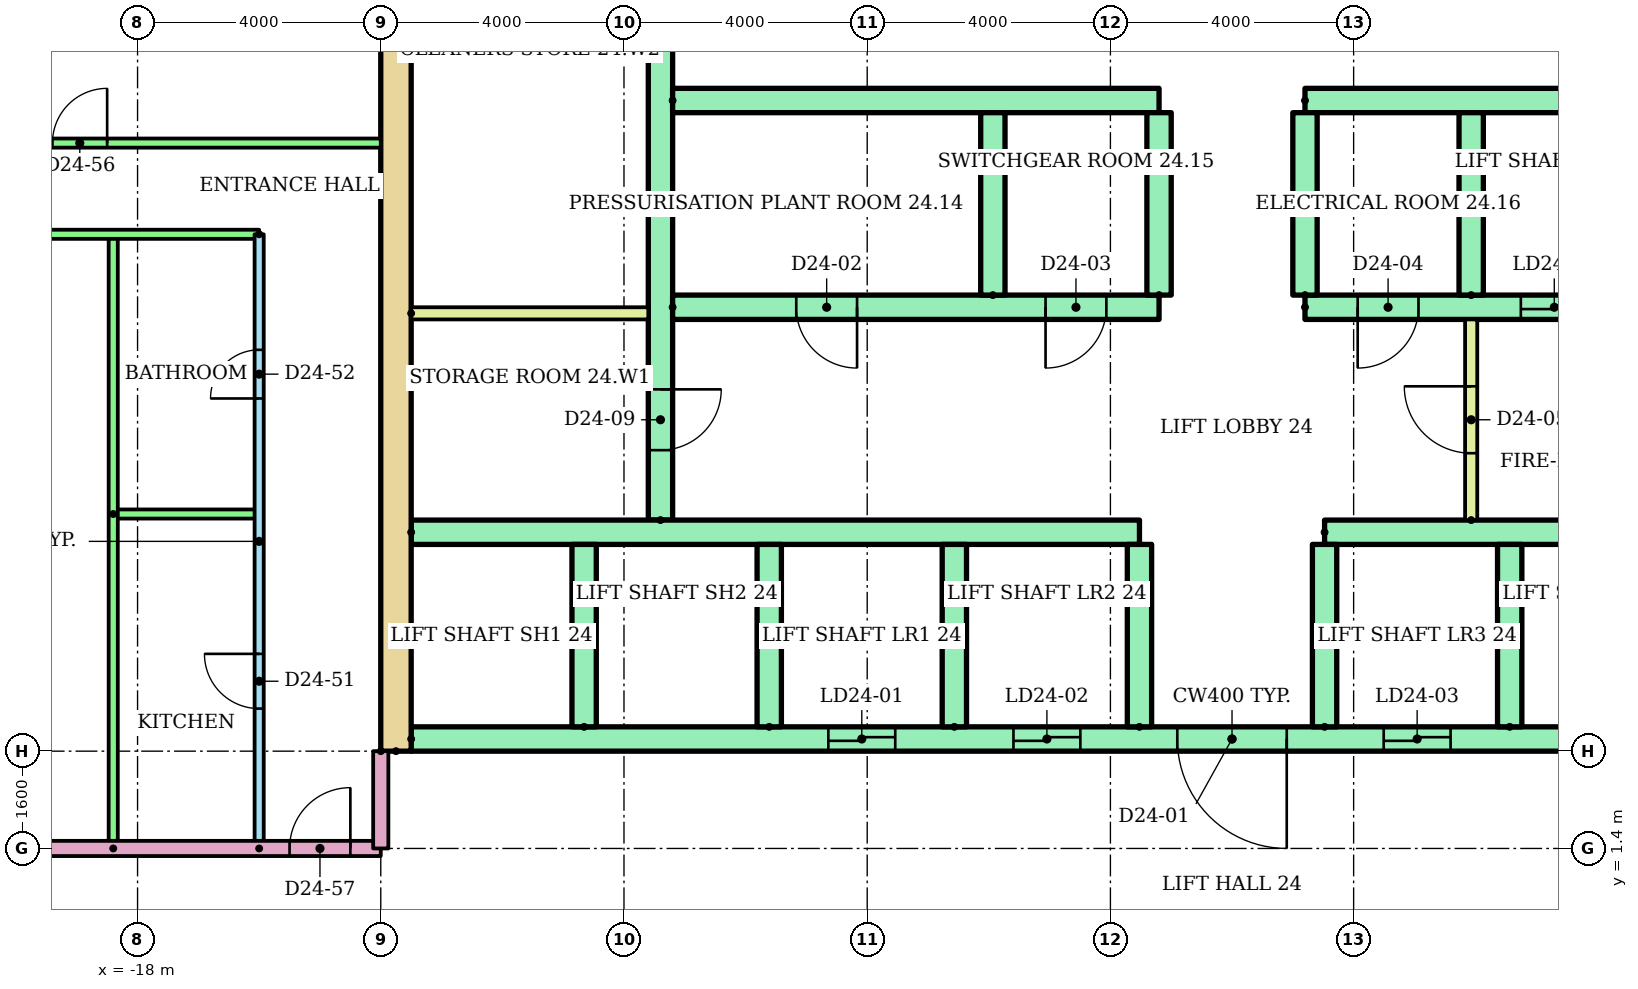
"""IFC4 building model, lengths in metres.
Left out: names, types, materials, properties, quantities, classifications, styles, units other than length and angle.
Written with IfcOpenShell. Run it as: python <this file> out.ifc"""

import sys

from ifc_helpers import new_model, si_unit, direction, frame, frame_2d, origin, place, context, subcontext, project, spatial, rectangle, extrude, element, fill, save


model = new_model("IFC4")
c1 = context("Model", 3, precision=1e-05, world=origin(), true_north=direction((0.0, 1.0)))
c2 = subcontext(c1, "Body", "Model", "MODEL_VIEW")
j1 = project(units=[si_unit("LENGTHUNIT", "METRE"), si_unit("PLANEANGLEUNIT", "RADIAN")], contexts=[c1])
p1 = place(None, origin())
s1 = spatial("IfcSite", under=j1, at=p1, CompositionType="ELEMENT")
p2 = place(p1, origin())
s2 = spatial("IfcBuilding", under=s1, at=p2, CompositionType="ELEMENT")
p3 = place(p2, frame((0.0, 0.0, 93.5)))
s3 = spatial("IfcBuildingStorey", under=s2, at=p3, CompositionType="ELEMENT", Elevation=93.5)
p4 = place(p3, frame((-13.75, 3.0, 0.0), z_axis=(0.0, 0.0, 1.0), x_axis=(0.0, 1.0, 0.0)))
e1 = element("IfcWall", 1, at=p4, inside=s3, PredefinedType="SHEAR", context=c2, shape_type="SweptSolid", body=[
    extrude(rectangle(XDim=17.0, YDim=0.5, at=frame_2d((8.5, 0.0))), origin(), (0.0, 0.0, 1.0), 2.92),
])
p5 = place(p3, frame((-9.4, 6.8, 0.0), z_axis=(0.0, 0.0, 1.0), x_axis=(0.0, 1.0, 0.0)))
e2 = element("IfcWall", 2, at=p5, inside=s3, PredefinedType="SHEAR", context=c2, shape_type="SweptSolid", body=[
    extrude(rectangle(XDim=12.7, YDim=0.4, at=frame_2d((6.35, 0.0))), origin(), (0.0, 0.0, 1.0), 2.92),
])
p6 = place(p5, frame((1.15, 0.0, 0.0)))
e3 = element("IfcOpeningElement", 3, at=p6, cuts=e2, PredefinedType="OPENING", context=c2, shape_type="SweptSolid", body=[
    extrude(rectangle(XDim=1.0, YDim=2.1, at=frame_2d((0.5, 1.05))), frame((0.0, 0.21, 0.0), z_axis=(0.0, -1.0, 0.0), x_axis=(1.0, 0.0, 0.0)), (0.0, 0.0, 1.0), 0.42),
])
p7 = place(p5, frame((7.925, 0.0, 0.0)))
e4 = element("IfcOpeningElement", 4, at=p7, cuts=e2, PredefinedType="OPENING", context=c2, shape_type="SweptSolid", body=[
    extrude(rectangle(XDim=1.0, YDim=2.1, at=frame_2d((0.5, 1.05))), frame((0.0, 0.21, 0.0), z_axis=(0.0, -1.0, 0.0), x_axis=(1.0, 0.0, 0.0)), (0.0, 0.0, 1.0), 0.42),
])
p8 = place(p3, frame((-13.5, 3.2, 0.0)))
e5 = element("IfcWall", 5, at=p8, inside=s3, PredefinedType="SHEAR", context=c2, shape_type="SweptSolid", body=[
    extrude(rectangle(XDim=27.0, YDim=0.4, at=frame_2d((13.5, 0.0))), origin(), (0.0, 0.0, 1.0), 2.92),
])
p9 = place(p8, frame((6.861, 0.0, 0.0)))
e6 = element("IfcOpeningElement", 6, at=p9, cuts=e5, PredefinedType="OPENING", context=c2, shape_type="SweptSolid", body=[
    extrude(rectangle(XDim=1.1, YDim=2.1, at=frame_2d((0.55, 1.05))), frame((0.0, 0.21, 0.0), z_axis=(0.0, -1.0, 0.0), x_axis=(1.0, 0.0, 0.0)), (0.0, 0.0, 1.0), 0.42),
])
p10 = place(p8, frame((9.906, 0.0, 0.0)))
e7 = element("IfcOpeningElement", 7, at=p10, cuts=e5, PredefinedType="OPENING", context=c2, shape_type="SweptSolid", body=[
    extrude(rectangle(XDim=1.1, YDim=2.1, at=frame_2d((0.55, 1.05))), frame((0.0, 0.21, 0.0), z_axis=(0.0, -1.0, 0.0), x_axis=(1.0, 0.0, 0.0)), (0.0, 0.0, 1.0), 0.42),
])
p11 = place(p8, frame((15.994, 0.0, 0.0)))
e8 = element("IfcOpeningElement", 8, at=p11, cuts=e5, PredefinedType="OPENING", context=c2, shape_type="SweptSolid", body=[
    extrude(rectangle(XDim=1.1, YDim=2.1, at=frame_2d((0.55, 1.05))), frame((0.0, 0.21, 0.0), z_axis=(0.0, -1.0, 0.0), x_axis=(1.0, 0.0, 0.0)), (0.0, 0.0, 1.0), 0.42),
])
p12 = place(p8, frame((19.039, 0.0, 0.0)))
e9 = element("IfcOpeningElement", 9, at=p12, cuts=e5, PredefinedType="OPENING", context=c2, shape_type="SweptSolid", body=[
    extrude(rectangle(XDim=1.1, YDim=2.1, at=frame_2d((0.55, 1.05))), frame((0.0, 0.21, 0.0), z_axis=(0.0, -1.0, 0.0), x_axis=(1.0, 0.0, 0.0)), (0.0, 0.0, 1.0), 0.42),
])
p13 = place(p8, frame((12.6, 0.0, 0.0)))
e10 = element("IfcOpeningElement", 10, at=p13, cuts=e5, PredefinedType="OPENING", context=c2, shape_type="SweptSolid", body=[
    extrude(rectangle(XDim=1.8, YDim=2.1, at=frame_2d((0.9, 1.05))), frame((0.0, 0.21, 0.0), z_axis=(0.0, -1.0, 0.0), x_axis=(1.0, 0.0, 0.0)), (0.0, 0.0, 1.0), 0.42),
])
p14 = place(p3, frame((-13.5, 6.6, 0.0)))
e11 = element("IfcWall", 11, at=p14, inside=s3, PredefinedType="SHEAR", context=c2, shape_type="SweptSolid", body=[
    extrude(rectangle(XDim=11.978, YDim=0.4, at=frame_2d((5.989, 0.0))), origin(), (0.0, 0.0, 1.0), 2.92),
])
p15 = place(p3, frame((1.522, 6.6, 0.0)))
e12 = element("IfcWall", 12, at=p15, inside=s3, PredefinedType="SHEAR", context=c2, shape_type="SweptSolid", body=[
    extrude(rectangle(XDim=8.078, YDim=0.4, at=frame_2d((4.039, 0.0))), origin(), (0.0, 0.0, 1.0), 2.92),
])
for number, where, z_axis, x_axis in (
    (13, (-10.656, 3.4, 0.0), (0.0, 0.0, 1.0), (0.0, 1.0, 0.0)),
    (14, (-7.611, 3.4, 0.0), (0.0, 0.0, 1.0), (0.0, 1.0, 0.0)),
    (15, (-4.567, 3.4, 0.0), (0.0, 0.0, 1.0), (0.0, 1.0, 0.0)),
    (16, (-1.522, 3.4, 0.0), (0.0, 0.0, 1.0), (0.0, 1.0, 0.0)),
    (17, (1.522, 3.4, 0.0), (0.0, 0.0, 1.0), (0.0, 1.0, 0.0)),
    (18, (4.567, 3.4, 0.0), (0.0, 0.0, 1.0), (0.0, 1.0, 0.0)),
):
    element("IfcWall", number, at=place(p3, frame(where, z_axis=z_axis, x_axis=x_axis)), inside=s3, PredefinedType="SHEAR", context=c2, shape_type="SweptSolid", body=[
        extrude(rectangle(XDim=3.0, YDim=0.4, at=frame_2d((1.5, 0.0))), origin(), (0.0, 0.0, 1.0), 2.92),
    ])
p16 = place(p3, frame((-9.2, 10.3, 0.0)))
e19 = element("IfcWall", 19, at=p16, inside=s3, PredefinedType="SHEAR", context=c2, shape_type="SweptSolid", body=[
    extrude(rectangle(XDim=8.0, YDim=0.4, at=frame_2d((4.0, 0.0))), origin(), (0.0, 0.0, 1.0), 2.92),
])
p17 = place(p16, frame((2.033, 0.0, 0.0)))
e20 = element("IfcOpeningElement", 20, at=p17, cuts=e19, PredefinedType="OPENING", context=c2, shape_type="SweptSolid", body=[
    extrude(rectangle(XDim=1.0, YDim=2.1, at=frame_2d((0.5, 1.05))), frame((0.0, 0.21, 0.0), z_axis=(0.0, -1.0, 0.0), x_axis=(1.0, 0.0, 0.0)), (0.0, 0.0, 1.0), 0.42),
])
p18 = place(p16, frame((6.133, 0.0, 0.0)))
e21 = element("IfcOpeningElement", 21, at=p18, cuts=e19, PredefinedType="OPENING", context=c2, shape_type="SweptSolid", body=[
    extrude(rectangle(XDim=1.0, YDim=2.1, at=frame_2d((0.5, 1.05))), frame((0.0, 0.21, 0.0), z_axis=(0.0, -1.0, 0.0), x_axis=(1.0, 0.0, 0.0)), (0.0, 0.0, 1.0), 0.42),
])
p19 = place(p3, frame((-9.2, 13.7, 0.0)))
e22 = element("IfcWall", 22, at=p19, inside=s3, PredefinedType="SHEAR", context=c2, shape_type="SweptSolid", body=[
    extrude(rectangle(XDim=8.0, YDim=0.4, at=frame_2d((4.0, 0.0))), origin(), (0.0, 0.0, 1.0), 2.92),
])
p20 = place(p3, frame((1.2, 10.3, 0.0)))
e23 = element("IfcWall", 23, at=p20, inside=s3, PredefinedType="SHEAR", context=c2, shape_type="SweptSolid", body=[
    extrude(rectangle(XDim=8.0, YDim=0.4, at=frame_2d((4.0, 0.0))), origin(), (0.0, 0.0, 1.0), 2.92),
])
p21 = place(p20, frame((3.55, 0.0, 0.0)))
e24 = element("IfcOpeningElement", 24, at=p21, cuts=e23, PredefinedType="OPENING", context=c2, shape_type="SweptSolid", body=[
    extrude(rectangle(XDim=1.1, YDim=2.1, at=frame_2d((0.55, 1.05))), frame((0.0, 0.21, 0.0), z_axis=(0.0, -1.0, 0.0), x_axis=(1.0, 0.0, 0.0)), (0.0, 0.0, 1.0), 0.42),
])
p22 = place(p20, frame((6.283, 0.0, 0.0)))
e25 = element("IfcOpeningElement", 25, at=p22, cuts=e23, PredefinedType="OPENING", context=c2, shape_type="SweptSolid", body=[
    extrude(rectangle(XDim=1.1, YDim=2.1, at=frame_2d((0.55, 1.05))), frame((0.0, 0.21, 0.0), z_axis=(0.0, -1.0, 0.0), x_axis=(1.0, 0.0, 0.0)), (0.0, 0.0, 1.0), 0.42),
])
p23 = place(p20, frame((0.867, 0.0, 0.0)))
e26 = element("IfcOpeningElement", 26, at=p23, cuts=e23, PredefinedType="OPENING", context=c2, shape_type="SweptSolid", body=[
    extrude(rectangle(XDim=1.0, YDim=2.1, at=frame_2d((0.5, 1.05))), frame((0.0, 0.21, 0.0), z_axis=(0.0, -1.0, 0.0), x_axis=(1.0, 0.0, 0.0)), (0.0, 0.0, 1.0), 0.42),
])
p24 = place(p3, frame((1.2, 13.7, 0.0)))
e27 = element("IfcWall", 27, at=p24, inside=s3, PredefinedType="SHEAR", context=c2, shape_type="SweptSolid", body=[
    extrude(rectangle(XDim=8.0, YDim=0.4, at=frame_2d((4.0, 0.0))), origin(), (0.0, 0.0, 1.0), 2.92),
])
for number, where, z_axis, x_axis in (
    (28, (-3.933, 10.5, 0.0), (0.0, 0.0, 1.0), (0.0, 1.0, 0.0)),
    (29, (-1.2, 10.5, 0.0), (0.0, 0.0, 1.0), (0.0, 1.0, 0.0)),
    (30, (1.2, 10.5, 0.0), (0.0, 0.0, 1.0), (0.0, 1.0, 0.0)),
    (31, (3.933, 10.5, 0.0), (0.0, 0.0, 1.0), (0.0, 1.0, 0.0)),
):
    element("IfcWall", number, at=place(p3, frame(where, z_axis=z_axis, x_axis=x_axis)), inside=s3, PredefinedType="SHEAR", context=c2, shape_type="SweptSolid", body=[
        extrude(rectangle(XDim=3.0, YDim=0.4, at=frame_2d((1.5, 0.0))), origin(), (0.0, 0.0, 1.0), 2.92),
    ])
p25 = place(p3, frame((3.933, 6.8, 0.0), z_axis=(0.0, 0.0, 1.0), x_axis=(0.0, 1.0, 0.0)))
e32 = element("IfcWall", 32, at=p25, inside=s3, PredefinedType="PARTITIONING", context=c2, shape_type="SweptSolid", body=[
    extrude(rectangle(XDim=3.3, YDim=0.2, at=frame_2d((1.65, 0.0))), origin(), (0.0, 0.0, 1.0), 2.92),
])
p26 = place(p25, frame((1.1, 0.0, 0.0)))
e33 = element("IfcOpeningElement", 33, at=p26, cuts=e32, PredefinedType="OPENING", context=c2, shape_type="SweptSolid", body=[
    extrude(rectangle(XDim=1.1, YDim=2.1, at=frame_2d((0.55, 1.05))), frame((0.0, 0.11, 0.0), z_axis=(0.0, -1.0, 0.0), x_axis=(1.0, 0.0, 0.0)), (0.0, 0.0, 1.0), 0.22),
])
p27 = place(p3, frame((-13.5, 10.2, 0.0)))
e34 = element("IfcWall", 34, at=p27, inside=s3, PredefinedType="PARTITIONING", context=c2, shape_type="SweptSolid", body=[
    extrude(rectangle(XDim=3.9, YDim=0.2, at=frame_2d((1.95, 0.0))), origin(), (0.0, 0.0, 1.0), 2.92),
])
p28 = place(p3, frame((-16.0, 1.4, 0.0), z_axis=(0.0, 0.0, 1.0), x_axis=(0.0, 1.0, 0.0)))
e35 = element("IfcWall", 35, at=p28, inside=s3, PredefinedType="PARTITIONING", context=c2, shape_type="SweptSolid", body=[
    extrude(rectangle(XDim=10.1, YDim=0.15, at=frame_2d((5.05, 0.0))), origin(), (0.0, 0.0, 1.0), 2.4),
])
p29 = place(p28, frame((2.3, 0.0, 0.0)))
e36 = element("IfcOpeningElement", 36, at=p29, cuts=e35, PredefinedType="OPENING", context=c2, shape_type="SweptSolid", body=[
    extrude(rectangle(XDim=0.9, YDim=2.1, at=frame_2d((0.45, 1.05))), frame((0.0, 0.085, 0.0), z_axis=(0.0, -1.0, 0.0), x_axis=(1.0, 0.0, 0.0)), (0.0, 0.0, 1.0), 0.17),
])
p30 = place(p28, frame((7.4, 0.0, 0.0)))
e37 = element("IfcOpeningElement", 37, at=p30, cuts=e35, PredefinedType="OPENING", context=c2, shape_type="SweptSolid", body=[
    extrude(rectangle(XDim=0.8, YDim=2.1, at=frame_2d((0.4, 1.05))), frame((0.0, 0.085, 0.0), z_axis=(0.0, -1.0, 0.0), x_axis=(1.0, 0.0, 0.0)), (0.0, 0.0, 1.0), 0.17),
])
p31 = place(p3, frame((-18.4, 6.9, 0.0)))
e38 = element("IfcWall", 38, at=p31, inside=s3, PredefinedType="PARTITIONING", context=c2, shape_type="SweptSolid", body=[
    extrude(rectangle(XDim=2.4, YDim=0.15, at=frame_2d((1.2, 0.0))), origin(), (0.0, 0.0, 1.0), 2.4),
])
p32 = place(p3, frame((-18.4, 1.4, 0.0), z_axis=(0.0, 0.0, 1.0), x_axis=(0.0, 1.0, 0.0)))
e39 = element("IfcWall", 39, at=p32, inside=s3, PredefinedType="PARTITIONING", context=c2, shape_type="SweptSolid", body=[
    extrude(rectangle(XDim=10.1, YDim=0.15, at=frame_2d((5.05, 0.0))), origin(), (0.0, 0.0, 1.0), 2.4),
])
p33 = place(p3, frame((-16.0, 11.5, 0.0), z_axis=(0.0, 0.0, 1.0), x_axis=(-1.0, 0.0, 0.0)))
e40 = element("IfcWall", 40, at=p33, inside=s3, PredefinedType="PARTITIONING", context=c2, shape_type="SweptSolid", body=[
    extrude(rectangle(XDim=12.62, YDim=0.15, at=frame_2d((6.31, 0.0))), origin(), (0.0, 0.0, 1.0), 2.4),
])
p34 = place(p33, frame((4.411, 0.0, 0.0)))
e41 = element("IfcOpeningElement", 41, at=p34, cuts=e40, PredefinedType="OPENING", context=c2, shape_type="SweptSolid", body=[
    extrude(rectangle(XDim=0.9, YDim=2.1, at=frame_2d((0.45, 1.05))), frame((0.0, 0.085, 0.0), z_axis=(0.0, -1.0, 0.0), x_axis=(1.0, 0.0, 0.0)), (0.0, 0.0, 1.0), 0.17),
])
p35 = place(p33, frame((9.825, 0.0, 0.0)))
e42 = element("IfcOpeningElement", 42, at=p35, cuts=e40, PredefinedType="OPENING", context=c2, shape_type="SweptSolid", body=[
    extrude(rectangle(XDim=0.9, YDim=2.1, at=frame_2d((0.45, 1.05))), frame((0.0, 0.085, 0.0), z_axis=(0.0, -1.0, 0.0), x_axis=(1.0, 0.0, 0.0)), (0.0, 0.0, 1.0), 0.17),
])
p36 = place(p3, frame((-28.62, 13.0, 0.0)))
e43 = element("IfcWall", 43, at=p36, inside=s3, PredefinedType="PARTITIONING", context=c2, shape_type="SweptSolid", body=[
    extrude(rectangle(XDim=14.62, YDim=0.15, at=frame_2d((7.31, 0.0))), origin(), (0.0, 0.0, 1.0), 2.4),
])
p37 = place(p36, frame((1.97, 0.0, 0.0)))
e44 = element("IfcOpeningElement", 44, at=p37, cuts=e43, PredefinedType="OPENING", context=c2, shape_type="SweptSolid", body=[
    extrude(rectangle(XDim=1.0, YDim=2.1, at=frame_2d((0.5, 1.05))), frame((0.0, 0.085, 0.0), z_axis=(0.0, -1.0, 0.0), x_axis=(1.0, 0.0, 0.0)), (0.0, 0.0, 1.0), 0.17),
])
p38 = place(p36, frame((9.22, 0.0, 0.0)))
e45 = element("IfcOpeningElement", 45, at=p38, cuts=e43, PredefinedType="OPENING", context=c2, shape_type="SweptSolid", body=[
    extrude(rectangle(XDim=0.9, YDim=2.1, at=frame_2d((0.45, 1.05))), frame((0.0, 0.085, 0.0), z_axis=(0.0, -1.0, 0.0), x_axis=(1.0, 0.0, 0.0)), (0.0, 0.0, 1.0), 0.17),
])
p39 = place(p3, frame((-28.62, 1.4, 0.0)))
e46 = element("IfcWall", 46, at=p39, inside=s3, PredefinedType="PARTITIONING", context=c2, shape_type="SweptSolid", body=[
    extrude(rectangle(XDim=14.62, YDim=0.25, at=frame_2d((7.31, 0.0))), origin(), (0.0, 0.0, 1.0), 2.4),
])
p40 = place(p39, frame((13.12, 0.0, 0.0)))
e47 = element("IfcOpeningElement", 47, at=p40, cuts=e46, PredefinedType="OPENING", context=c2, shape_type="SweptSolid", body=[
    extrude(rectangle(XDim=1.0, YDim=2.1, at=frame_2d((0.5, 1.05))), frame((0.0, 0.135, 0.0), z_axis=(0.0, -1.0, 0.0), x_axis=(1.0, 0.0, 0.0)), (0.0, 0.0, 1.0), 0.27),
])
p41 = place(p3, frame((-14.0, 3.0, 0.0), z_axis=(0.0, 0.0, 1.0), x_axis=(0.0, -1.0, 0.0)))
e48 = element("IfcWall", 48, at=p41, inside=s3, PredefinedType="PARTITIONING", context=c2, shape_type="SweptSolid", body=[
    extrude(rectangle(XDim=1.6, YDim=0.25, at=frame_2d((0.8, 0.0))), origin(), (0.0, 0.0, 1.0), 2.4),
])
p42 = place(p9, origin())
e49 = element("IfcDoor", 49, at=p42, inside=s3, OperationType="SLIDING_TO_LEFT", PredefinedType="DOOR", context=c2, shape_type="SweptSolid", body=[
    extrude(rectangle(XDim=1.1, YDim=2.1, at=frame_2d((0.55, 1.05))), frame((0.0, 0.025, 0.0), z_axis=(0.0, -1.0, 0.0), x_axis=(1.0, 0.0, 0.0)), (0.0, 0.0, 1.0), 0.05),
])
fill(e6, e49)
p43 = place(p10, origin())
e50 = element("IfcDoor", 50, at=p43, inside=s3, OperationType="SLIDING_TO_LEFT", PredefinedType="DOOR", context=c2, shape_type="SweptSolid", body=[
    extrude(rectangle(XDim=1.1, YDim=2.1, at=frame_2d((0.55, 1.05))), frame((0.0, 0.025, 0.0), z_axis=(0.0, -1.0, 0.0), x_axis=(1.0, 0.0, 0.0)), (0.0, 0.0, 1.0), 0.05),
])
fill(e7, e50)
p44 = place(p11, origin())
e51 = element("IfcDoor", 51, at=p44, inside=s3, OperationType="SLIDING_TO_LEFT", PredefinedType="DOOR", context=c2, shape_type="SweptSolid", body=[
    extrude(rectangle(XDim=1.1, YDim=2.1, at=frame_2d((0.55, 1.05))), frame((0.0, 0.025, 0.0), z_axis=(0.0, -1.0, 0.0), x_axis=(1.0, 0.0, 0.0)), (0.0, 0.0, 1.0), 0.05),
])
fill(e8, e51)
p45 = place(p13, frame((1.8, 0.0, 0.0), z_axis=(0.0, 0.0, 1.0), x_axis=(-1.0, 0.0, 0.0)))
e52 = element("IfcDoor", 52, at=p45, inside=s3, OperationType="DOUBLE_DOOR_SINGLE_SWING", PredefinedType="DOOR", context=c2, shape_type="SweptSolid", body=[
    extrude(rectangle(XDim=1.8, YDim=2.1, at=frame_2d((0.9, 1.05))), frame((0.0, 0.025, 0.0), z_axis=(0.0, -1.0, 0.0), x_axis=(1.0, 0.0, 0.0)), (0.0, 0.0, 1.0), 0.05),
])
fill(e10, e52)
p46 = place(p21, origin())
e53 = element("IfcDoor", 53, at=p46, inside=s3, OperationType="SLIDING_TO_LEFT", PredefinedType="DOOR", context=c2, shape_type="SweptSolid", body=[
    extrude(rectangle(XDim=1.1, YDim=2.1, at=frame_2d((0.55, 1.05))), frame((0.0, 0.025, 0.0), z_axis=(0.0, -1.0, 0.0), x_axis=(1.0, 0.0, 0.0)), (0.0, 0.0, 1.0), 0.05),
])
fill(e24, e53)
p47 = place(p17, frame((1.0, 0.0, 0.0), z_axis=(0.0, 0.0, 1.0), x_axis=(-1.0, 0.0, 0.0)))
e54 = element("IfcDoor", 54, at=p47, inside=s3, OperationType="SINGLE_SWING_RIGHT", PredefinedType="DOOR", context=c2, shape_type="SweptSolid", body=[
    extrude(rectangle(XDim=1.0, YDim=2.1, at=frame_2d((0.5, 1.05))), frame((0.0, 0.025, 0.0), z_axis=(0.0, -1.0, 0.0), x_axis=(1.0, 0.0, 0.0)), (0.0, 0.0, 1.0), 0.05),
])
fill(e20, e54)
p48 = place(p18, frame((1.0, 0.0, 0.0), z_axis=(0.0, 0.0, 1.0), x_axis=(-1.0, 0.0, 0.0)))
e55 = element("IfcDoor", 55, at=p48, inside=s3, OperationType="SINGLE_SWING_LEFT", PredefinedType="DOOR", context=c2, shape_type="SweptSolid", body=[
    extrude(rectangle(XDim=1.0, YDim=2.1, at=frame_2d((0.5, 1.05))), frame((0.0, 0.025, 0.0), z_axis=(0.0, -1.0, 0.0), x_axis=(1.0, 0.0, 0.0)), (0.0, 0.0, 1.0), 0.05),
])
fill(e21, e55)
p49 = place(p23, frame((1.0, 0.0, 0.0), z_axis=(0.0, 0.0, 1.0), x_axis=(-1.0, 0.0, 0.0)))
e56 = element("IfcDoor", 56, at=p49, inside=s3, OperationType="SINGLE_SWING_LEFT", PredefinedType="DOOR", context=c2, shape_type="SweptSolid", body=[
    extrude(rectangle(XDim=1.0, YDim=2.1, at=frame_2d((0.5, 1.05))), frame((0.0, 0.025, 0.0), z_axis=(0.0, -1.0, 0.0), x_axis=(1.0, 0.0, 0.0)), (0.0, 0.0, 1.0), 0.05),
])
fill(e26, e56)
p50 = place(p26, origin())
e57 = element("IfcDoor", 57, at=p50, inside=s3, OperationType="SINGLE_SWING_RIGHT", PredefinedType="DOOR", context=c2, shape_type="SweptSolid", body=[
    extrude(rectangle(XDim=1.1, YDim=2.1, at=frame_2d((0.55, 1.05))), frame((0.0, 0.025, 0.0), z_axis=(0.0, -1.0, 0.0), x_axis=(1.0, 0.0, 0.0)), (0.0, 0.0, 1.0), 0.05),
])
fill(e33, e57)
p51 = place(p6, frame((1.0, 0.0, 0.0), z_axis=(0.0, 0.0, 1.0), x_axis=(-1.0, 0.0, 0.0)))
e58 = element("IfcDoor", 58, at=p51, inside=s3, OperationType="SINGLE_SWING_RIGHT", PredefinedType="DOOR", context=c2, shape_type="SweptSolid", body=[
    extrude(rectangle(XDim=1.0, YDim=2.1, at=frame_2d((0.5, 1.05))), frame((0.0, 0.025, 0.0), z_axis=(0.0, -1.0, 0.0), x_axis=(1.0, 0.0, 0.0)), (0.0, 0.0, 1.0), 0.05),
])
fill(e3, e58)
p52 = place(p29, origin())
e59 = element("IfcDoor", 59, at=p52, inside=s3, OperationType="SINGLE_SWING_RIGHT", PredefinedType="DOOR", context=c2, shape_type="SweptSolid", body=[
    extrude(rectangle(XDim=0.9, YDim=2.1, at=frame_2d((0.45, 1.05))), frame((0.0, 0.025, 0.0), z_axis=(0.0, -1.0, 0.0), x_axis=(1.0, 0.0, 0.0)), (0.0, 0.0, 1.0), 0.05),
])
fill(e36, e59)
p53 = place(p30, origin())
e60 = element("IfcDoor", 60, at=p53, inside=s3, OperationType="SINGLE_SWING_LEFT", PredefinedType="DOOR", context=c2, shape_type="SweptSolid", body=[
    extrude(rectangle(XDim=0.8, YDim=2.1, at=frame_2d((0.4, 1.05))), frame((0.0, 0.025, 0.0), z_axis=(0.0, -1.0, 0.0), x_axis=(1.0, 0.0, 0.0)), (0.0, 0.0, 1.0), 0.05),
])
fill(e37, e60)
p54 = place(p38, origin())
e61 = element("IfcDoor", 61, at=p54, inside=s3, OperationType="SINGLE_SWING_RIGHT", PredefinedType="DOOR", context=c2, shape_type="SweptSolid", body=[
    extrude(rectangle(XDim=0.9, YDim=2.1, at=frame_2d((0.45, 1.05))), frame((0.0, 0.025, 0.0), z_axis=(0.0, -1.0, 0.0), x_axis=(1.0, 0.0, 0.0)), (0.0, 0.0, 1.0), 0.05),
])
fill(e45, e61)
p55 = place(p40, origin())
e62 = element("IfcDoor", 62, at=p55, inside=s3, OperationType="SINGLE_SWING_RIGHT", PredefinedType="DOOR", context=c2, shape_type="SweptSolid", body=[
    extrude(rectangle(XDim=1.0, YDim=2.1, at=frame_2d((0.5, 1.05))), frame((0.0, 0.025, 0.0), z_axis=(0.0, -1.0, 0.0), x_axis=(1.0, 0.0, 0.0)), (0.0, 0.0, 1.0), 0.05),
])
fill(e47, e62)
save(model, sys.argv[1])
